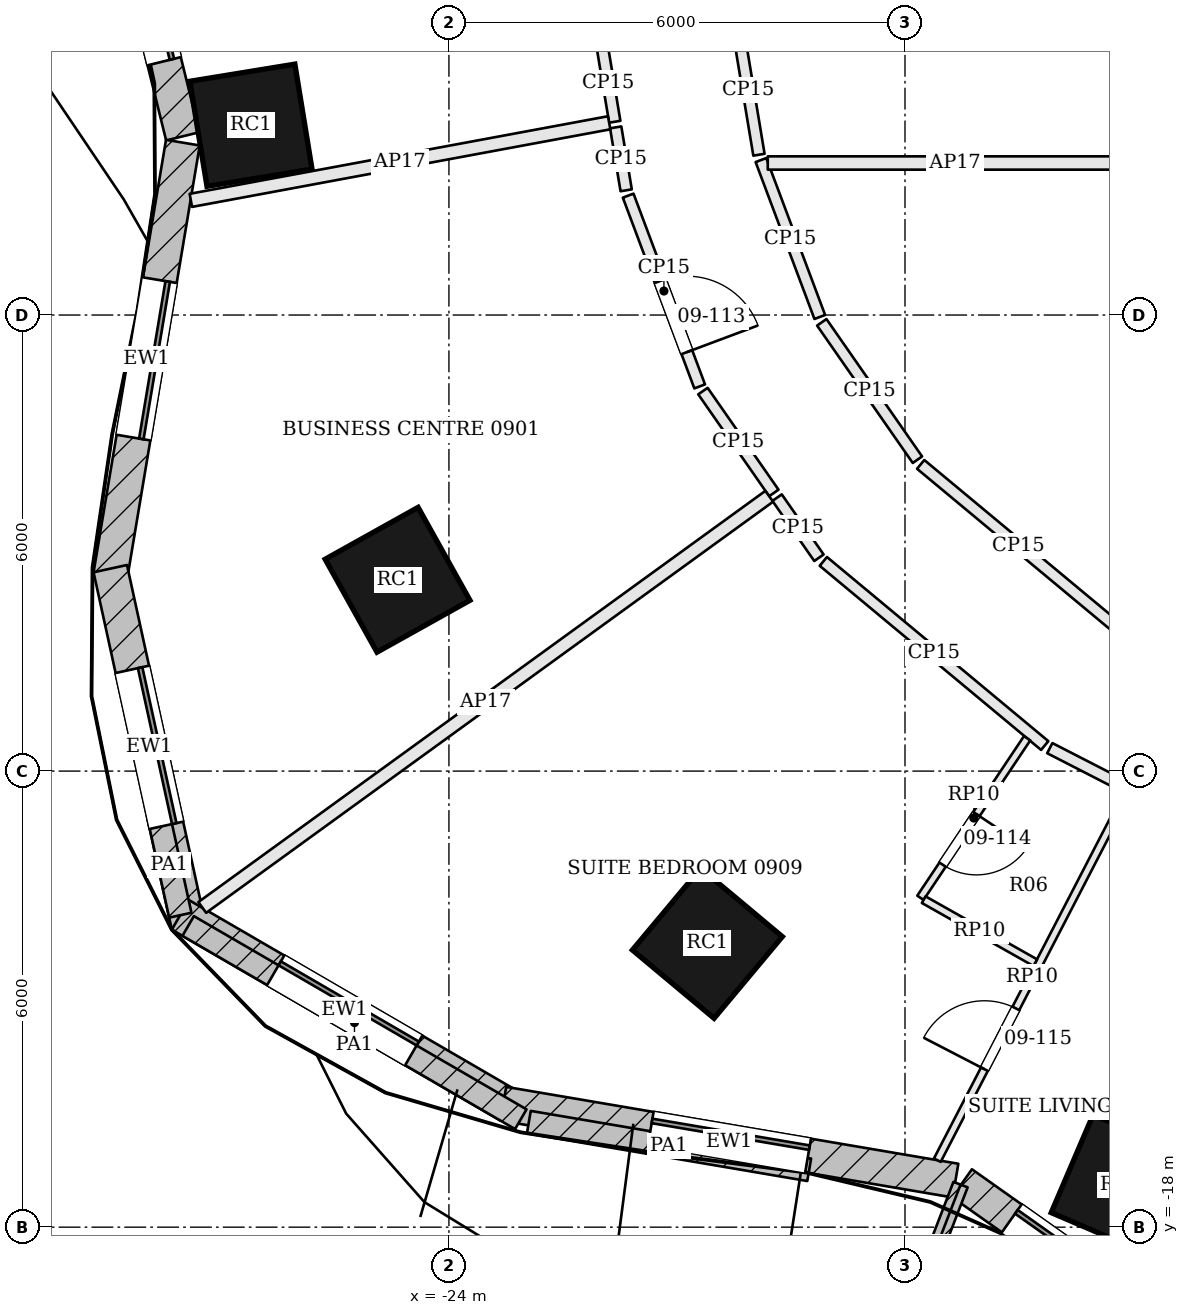
"""IFC4 building model, lengths in metres.
Left out: names, types, materials, properties, quantities, classifications, styles, units other than length and angle.
Written with IfcOpenShell. Run it as: python <this file> out.ifc"""

import sys

from ifc_helpers import new_model, si_unit, direction, frame, frame_2d, origin, origin_2d, place, context, subcontext, project, spatial, rectangle, extrude, element, fill, save


model = new_model("IFC4")
c1 = context("Model", 3, precision=1e-05, world=origin(), true_north=direction((0.0, 1.0)))
c2 = subcontext(c1, "Body", "Model", "MODEL_VIEW")
j1 = project(units=[si_unit("LENGTHUNIT", "METRE"), si_unit("PLANEANGLEUNIT", "RADIAN")], contexts=[c1])
p1 = place(None, origin())
s1 = spatial("IfcSite", under=j1, at=p1, CompositionType="ELEMENT")
p2 = place(p1, origin())
s2 = spatial("IfcBuilding", under=s1, at=p2, CompositionType="ELEMENT")
p3 = place(p2, frame((0.0, 0.0, 48.3)))
s3 = spatial("IfcBuildingStorey", under=s2, at=p3, CompositionType="ELEMENT", Elevation=48.3)
for number, where, z_axis, x_axis in (
    (1, (-26.605, -3.503, 0.0), (0.0, 0.0, 1.0), (0.161, -0.987, 0.0)),
    (2, (-24.676, -9.483, 0.0), (0.0, 0.0, 1.0), (0.487, -0.873, 0.0)),
    (3, (-20.6, -14.266, 0.0), (0.0, 0.0, 1.0), (0.767, -0.641, 0.0)),
    (4, (-15.157, -17.441, 0.0), (0.0, 0.0, 1.0), (0.919, -0.394, 0.0)),
):
    element("IfcColumn", number, at=place(p3, frame(where, z_axis=z_axis, x_axis=x_axis)), inside=s3, PredefinedType="COLUMN", context=c2, shape_type="SweptSolid", body=[
        extrude(rectangle(XDim=1.4, YDim=1.4, at=origin_2d()), origin(), (0.0, 0.0, 1.0), 3.6),
    ])
p4 = place(p3, frame((-28.422, 0.075, 0.0), z_axis=(0.0, 0.0, 1.0), x_axis=(0.239809222807, -0.970820033094, 0.0)))
e5 = element("IfcWall", 5, at=p4, inside=s3, PredefinedType="SOLIDWALL", context=c2, shape_type="SweptSolid", body=[
    extrude(rectangle(XDim=3.836, YDim=0.45, at=frame_2d((1.918, 0.0))), origin(), (0.0, 0.0, 1.0), 3.4),
])
p5 = place(p4, frame((1.018, 0.0, 0.9)))
e6 = element("IfcOpeningElement", 6, at=p5, cuts=e5, PredefinedType="OPENING", context=c2, shape_type="SweptSolid", body=[
    extrude(rectangle(XDim=1.8, YDim=2.0, at=frame_2d((0.9, 1.0))), frame((0.0, 0.235, 0.0), z_axis=(0.0, -1.0, 0.0), x_axis=(1.0, 0.0, 0.0)), (0.0, 0.0, 1.0), 0.47),
])
p6 = place(p3, frame((-27.5, -3.732, 0.0), z_axis=(0.0, 0.0, 1.0), x_axis=(-0.165174419367, -0.986264371853, 0.0)))
e7 = element("IfcWall", 7, at=p6, inside=s3, PredefinedType="SOLIDWALL", context=c2, shape_type="SweptSolid", body=[
    extrude(rectangle(XDim=5.769, YDim=0.45, at=frame_2d((2.885, 0.0))), origin(), (0.0, 0.0, 1.0), 3.4),
])
p7 = place(p6, frame((1.834, 0.0, 0.9)))
e8 = element("IfcOpeningElement", 8, at=p7, cuts=e7, PredefinedType="OPENING", context=c2, shape_type="SweptSolid", body=[
    extrude(rectangle(XDim=2.1, YDim=2.0, at=frame_2d((1.05, 1.0))), frame((0.0, 0.235, 0.0), z_axis=(0.0, -1.0, 0.0), x_axis=(1.0, 0.0, 0.0)), (0.0, 0.0, 1.0), 0.47),
])
p8 = place(p3, frame((-28.456, -9.337, 0.0), z_axis=(0.0, 0.0, 1.0), x_axis=(0.213878425795, -0.976860286315, 0.0)))
e9 = element("IfcWall", 9, at=p8, inside=s3, PredefinedType="SOLIDWALL", context=c2, shape_type="SweptSolid", body=[
    extrude(rectangle(XDim=4.812, YDim=0.45, at=frame_2d((2.406, 0.0))), origin(), (0.0, 0.0, 1.0), 3.4),
])
p9 = place(p8, frame((1.356, 0.0, 0.9)))
e10 = element("IfcOpeningElement", 10, at=p9, cuts=e9, PredefinedType="OPENING", context=c2, shape_type="SweptSolid", body=[
    extrude(rectangle(XDim=2.1, YDim=2.0, at=frame_2d((1.05, 1.0))), frame((0.0, 0.235, 0.0), z_axis=(0.0, -1.0, 0.0), x_axis=(1.0, 0.0, 0.0)), (0.0, 0.0, 1.0), 0.47),
])
p10 = place(p3, frame((-27.533, -13.891, 0.0), z_axis=(0.0, 0.0, 1.0), x_axis=(0.864657614938, -0.502361631625, 0.0)))
e11 = element("IfcWall", 11, at=p10, inside=s3, PredefinedType="SOLIDWALL", context=c2, shape_type="SweptSolid", body=[
    extrude(rectangle(XDim=5.001, YDim=0.45, at=frame_2d((2.5, 0.0))), origin(), (0.0, 0.0, 1.0), 3.4),
])
p11 = place(p10, frame((1.45, 0.0, 0.9)))
e12 = element("IfcOpeningElement", 12, at=p11, cuts=e11, PredefinedType="OPENING", context=c2, shape_type="SweptSolid", body=[
    extrude(rectangle(XDim=2.1, YDim=2.0, at=frame_2d((1.05, 1.0))), frame((0.0, 0.235, 0.0), z_axis=(0.0, -1.0, 0.0), x_axis=(1.0, 0.0, 0.0)), (0.0, 0.0, 1.0), 0.47),
])
p12 = place(p3, frame((-23.284, -16.376, 0.0), z_axis=(0.0, 0.0, 1.0), x_axis=(0.985861729428, -0.167560885797, 0.0)))
e13 = element("IfcWall", 13, at=p12, inside=s3, PredefinedType="SOLIDWALL", context=c2, shape_type="SweptSolid", body=[
    extrude(rectangle(XDim=6.033, YDim=0.45, at=frame_2d((3.017, 0.0))), origin(), (0.0, 0.0, 1.0), 3.4),
])
p13 = place(p12, frame((1.967, 0.0, 0.9)))
e14 = element("IfcOpeningElement", 14, at=p13, cuts=e13, PredefinedType="OPENING", context=c2, shape_type="SweptSolid", body=[
    extrude(rectangle(XDim=2.1, YDim=2.0, at=frame_2d((1.05, 1.0))), frame((0.0, 0.235, 0.0), z_axis=(0.0, -1.0, 0.0), x_axis=(1.0, 0.0, 0.0)), (0.0, 0.0, 1.0), 0.47),
])
p14 = place(p3, frame((-17.249, -17.422, 0.0), z_axis=(0.0, 0.0, 1.0), x_axis=(0.816589291225, -0.577219134694, 0.0)))
e15 = element("IfcWall", 15, at=p14, inside=s3, PredefinedType="SOLIDWALL", context=c2, shape_type="SweptSolid", body=[
    extrude(rectangle(XDim=3.701, YDim=0.45, at=frame_2d((1.851, 0.0))), origin(), (0.0, 0.0, 1.0), 3.4),
])
p15 = place(p14, frame((0.801, 0.0, 0.9)))
e16 = element("IfcOpeningElement", 16, at=p15, cuts=e15, PredefinedType="OPENING", context=c2, shape_type="SweptSolid", body=[
    extrude(rectangle(XDim=2.1, YDim=2.0, at=frame_2d((1.05, 1.0))), frame((0.0, 0.235, 0.0), z_axis=(0.0, -1.0, 0.0), x_axis=(1.0, 0.0, 0.0)), (0.0, 0.0, 1.0), 0.47),
])
p16 = place(p3, frame((-17.269, -17.44, 0.0), z_axis=(0.0, 0.0, 1.0), x_axis=(-0.359381039836, -0.933190906624, 0.0)))
e17 = element("IfcWall", 17, at=p16, inside=s3, PredefinedType="SOLIDWALL", context=c2, shape_type="SweptSolid", body=[
    extrude(rectangle(XDim=1.75, YDim=0.2, at=frame_2d((0.875, 0.0))), origin(), (0.0, 0.0, 1.0), 3.4),
])
p17 = place(p3, frame((-27.823, -12.577, 3.6), z_axis=(0.0, 0.0, 1.0), x_axis=(0.213826357694, -0.976871684898, 0.0)))
e18 = element("IfcWall", 18, at=p17, inside=s3, PredefinedType="PARAPET", context=c2, shape_type="SweptSolid", body=[
    extrude(rectangle(XDim=1.35, YDim=0.3, at=frame_2d((0.675, 0.0))), origin(), (0.0, 0.0, 1.0), 1.1),
])
p18 = place(p3, frame((-27.431, -14.038, 3.6), z_axis=(0.0, 0.0, 1.0), x_axis=(0.864664590165, -0.502349625773, 0.0)))
e19 = element("IfcWall", 19, at=p18, inside=s3, PredefinedType="PARAPET", context=c2, shape_type="SweptSolid", body=[
    extrude(rectangle(XDim=5.061, YDim=0.3, at=frame_2d((2.531, 0.0))), origin(), (0.0, 0.0, 1.0), 1.1),
])
p19 = place(p3, frame((-22.949, -16.618, 3.6), z_axis=(0.0, 0.0, 1.0), x_axis=(0.985859727788, -0.167572662229, 0.0)))
e20 = element("IfcWall", 20, at=p19, inside=s3, PredefinedType="PARAPET", context=c2, shape_type="SweptSolid", body=[
    extrude(rectangle(XDim=3.741, YDim=0.3, at=frame_2d((1.871, 0.0))), origin(), (0.0, 0.0, 1.0), 1.1),
])
p20 = place(p3, frame((-21.989, -2.43, 0.0), z_axis=(0.0, 0.0, 1.0), x_axis=(0.164170791844, -0.986431929281, 0.0)))
e21 = element("IfcWall", 21, at=p20, inside=s3, PredefinedType="PARTITIONING", context=c2, shape_type="SweptSolid", body=[
    extrude(rectangle(XDim=1.041, YDim=0.15, at=frame_2d((0.521, 0.0))), origin(), (0.0, 0.0, 1.0), 2.68),
])
p21 = place(p3, frame((-27.396, -4.491, 0.0), z_axis=(0.0, 0.0, 1.0), x_axis=(0.983238590395, 0.182323543069, 0.0)))
e22 = element("IfcWall", 22, at=p21, inside=s3, PredefinedType="PARTITIONING", context=c2, shape_type="SweptSolid", body=[
    extrude(rectangle(XDim=5.597, YDim=0.175, at=frame_2d((2.799, 0.0))), origin(), (0.0, 0.0, 1.0), 2.68),
])
p22 = place(p3, frame((-21.806, -3.531, 0.0), z_axis=(0.0, 0.0, 1.0), x_axis=(0.164068764938, -0.986448904086, 0.0)))
e23 = element("IfcWall", 23, at=p22, inside=s3, PredefinedType="PARTITIONING", context=c2, shape_type="SweptSolid", body=[
    extrude(rectangle(XDim=0.839, YDim=0.15, at=frame_2d((0.42, 0.0))), origin(), (0.0, 0.0, 1.0), 2.68),
])
p23 = place(p3, frame((-21.642, -4.429, 0.0), z_axis=(0.0, 0.0, 1.0), x_axis=(0.350963719781, -0.936389057709, 0.0)))
e24 = element("IfcWall", 24, at=p23, inside=s3, PredefinedType="PARTITIONING", context=c2, shape_type="SweptSolid", body=[
    extrude(rectangle(XDim=2.68, YDim=0.15, at=frame_2d((1.34, 0.0))), origin(), (0.0, 0.0, 1.0), 2.68),
])
p24 = place(p23, frame((1.199, 0.0, 0.0)))
e25 = element("IfcOpeningElement", 25, at=p24, cuts=e24, PredefinedType="OPENING", context=c2, shape_type="SweptSolid", body=[
    extrude(rectangle(XDim=1.0, YDim=2.1, at=frame_2d((0.5, 1.05))), frame((0.0, 0.085, 0.0), z_axis=(0.0, -1.0, 0.0), x_axis=(1.0, 0.0, 0.0)), (0.0, 0.0, 1.0), 0.17),
])
p25 = place(p3, frame((-20.658, -7.0, 0.0), z_axis=(0.0, 0.0, 1.0), x_axis=(0.571252828516, -0.820774150368, 0.0)))
e26 = element("IfcWall", 26, at=p25, inside=s3, PredefinedType="PARTITIONING", context=c2, shape_type="SweptSolid", body=[
    extrude(rectangle(XDim=1.633, YDim=0.15, at=frame_2d((0.816, 0.0))), origin(), (0.0, 0.0, 1.0), 2.68),
])
p26 = place(p3, frame((-27.245, -13.794, 0.0), z_axis=(0.0, 0.0, 1.0), x_axis=(0.809549997568, 0.587050935982, 0.0)))
e27 = element("IfcWall", 27, at=p26, inside=s3, PredefinedType="PARTITIONING", context=c2, shape_type="SweptSolid", body=[
    extrude(rectangle(XDim=9.214, YDim=0.175, at=frame_2d((4.607, 0.0))), origin(), (0.0, 0.0, 1.0), 2.68),
])
p27 = place(p3, frame((-19.683, -8.402, 0.0), z_axis=(0.0, 0.0, 1.0), x_axis=(0.571250030839, -0.820776097524, 0.0)))
e28 = element("IfcWall", 28, at=p27, inside=s3, PredefinedType="PARTITIONING", context=c2, shape_type="SweptSolid", body=[
    extrude(rectangle(XDim=0.964, YDim=0.15, at=frame_2d((0.482, 0.0))), origin(), (0.0, 0.0, 1.0), 2.68),
])
p28 = place(p3, frame((-19.074, -9.241, 0.0), z_axis=(0.0, 0.0, 1.0), x_axis=(0.768812565259, -0.639474189863, 0.0)))
e29 = element("IfcWall", 29, at=p28, inside=s3, PredefinedType="PARTITIONING", context=c2, shape_type="SweptSolid", body=[
    extrude(rectangle(XDim=3.788, YDim=0.15, at=frame_2d((1.894, 0.0))), origin(), (0.0, 0.0, 1.0), 2.68),
])
p29 = place(p3, frame((-16.095, -11.698, 0.0), z_axis=(0.0, 0.0, 1.0), x_axis=(0.88955984693, -0.456818649717, 0.0)))
e30 = element("IfcWall", 30, at=p29, inside=s3, PredefinedType="PARTITIONING", context=c2, shape_type="SweptSolid", body=[
    extrude(rectangle(XDim=2.991, YDim=0.15, at=frame_2d((1.496, 0.0))), origin(), (0.0, 0.0, 1.0), 2.68),
])
p30 = place(p29, frame((1.7, 0.0, 0.0)))
e31 = element("IfcOpeningElement", 31, at=p30, cuts=e30, PredefinedType="OPENING", context=c2, shape_type="SweptSolid", body=[
    extrude(rectangle(XDim=1.0, YDim=2.1, at=frame_2d((0.5, 1.05))), frame((0.0, 0.085, 0.0), z_axis=(0.0, -1.0, 0.0), x_axis=(1.0, 0.0, 0.0)), (0.0, 0.0, 1.0), 0.17),
])
p31 = place(p3, frame((-19.921, -3.891, 0.0), z_axis=(0.0, 0.0, 1.0), x_axis=(-0.164100753818, 0.986443583078, 0.0)))
e32 = element("IfcWall", 32, at=p31, inside=s3, PredefinedType="PARTITIONING", context=c2, shape_type="SweptSolid", body=[
    extrude(rectangle(XDim=1.726, YDim=0.15, at=frame_2d((0.863, 0.0))), origin(), (0.0, 0.0, 1.0), 2.68),
])
p32 = place(p3, frame((-15.221, -10.105, 0.0), z_axis=(0.0, 0.0, 1.0), x_axis=(-0.768812916989, 0.639473766992, 0.0)))
e33 = element("IfcWall", 33, at=p32, inside=s3, PredefinedType="PARTITIONING", context=c2, shape_type="SweptSolid", body=[
    extrude(rectangle(XDim=3.347, YDim=0.15, at=frame_2d((1.673, 0.0))), origin(), (0.0, 0.0, 1.0), 2.68),
])
p33 = place(p3, frame((-17.836, -7.904, 0.0), z_axis=(0.0, 0.0, 1.0), x_axis=(-0.571317790711, 0.820728933338, 0.0)))
e34 = element("IfcWall", 34, at=p33, inside=s3, PredefinedType="PARTITIONING", context=c2, shape_type="SweptSolid", body=[
    extrude(rectangle(XDim=2.202, YDim=0.15, at=frame_2d((1.101, 0.0))), origin(), (0.0, 0.0, 1.0), 2.68),
])
p34 = place(p3, frame((-19.121, -6.026, 0.0), z_axis=(0.0, 0.0, 1.0), x_axis=(-0.351026357955, 0.936365578191, 0.0)))
e35 = element("IfcWall", 35, at=p34, inside=s3, PredefinedType="PARTITIONING", context=c2, shape_type="SweptSolid", body=[
    extrude(rectangle(XDim=2.205, YDim=0.15, at=frame_2d((1.103, 0.0))), origin(), (0.0, 0.0, 1.0), 2.68),
])
p35 = place(p3, frame((-17.575, -17.118, 0.0), z_axis=(0.0, 0.0, 1.0), x_axis=(0.459775633783, 0.888035115623, 0.0)))
e36 = element("IfcWall", 36, at=p35, inside=s3, PredefinedType="PARTITIONING", context=c2, shape_type="SweptSolid", body=[
    extrude(rectangle(XDim=5.423, YDim=0.1, at=frame_2d((2.711, 0.0))), origin(), (0.0, 0.0, 1.0), 2.934),
])
p36 = place(p35, frame((1.348, 0.0, 0.0)))
e37 = element("IfcOpeningElement", 37, at=p36, cuts=e36, PredefinedType="OPENING", context=c2, shape_type="SweptSolid", body=[
    extrude(rectangle(XDim=0.9, YDim=2.4, at=frame_2d((0.45, 1.2))), frame((0.0, 0.06, 0.0), z_axis=(0.0, -1.0, 0.0), x_axis=(1.0, 0.0, 0.0)), (0.0, 0.0, 1.0), 0.12),
])
p37 = place(p3, frame((-16.393, -11.568, 0.0), z_axis=(0.0, 0.0, 1.0), x_axis=(-0.555949061639, -0.831216362245, 0.0)))
e38 = element("IfcWall", 38, at=p37, inside=s3, PredefinedType="PARTITIONING", context=c2, shape_type="SweptSolid", body=[
    extrude(rectangle(XDim=2.525, YDim=0.1, at=frame_2d((1.263, 0.0))), origin(), (0.0, 0.0, 1.0), 2.934),
])
p38 = place(p37, frame((1.2, 0.0, 0.0)))
e39 = element("IfcOpeningElement", 39, at=p38, cuts=e38, PredefinedType="OPENING", context=c2, shape_type="SweptSolid", body=[
    extrude(rectangle(XDim=0.8, YDim=2.1, at=frame_2d((0.4, 1.05))), frame((0.0, 0.06, 0.0), z_axis=(0.0, -1.0, 0.0), x_axis=(1.0, 0.0, 0.0)), (0.0, 0.0, 1.0), 0.12),
])
p39 = place(p3, frame((-17.754, -13.692, 0.0), z_axis=(0.0, 0.0, 1.0), x_axis=(0.870754296655, -0.491718369452, 0.0)))
e40 = element("IfcWall", 40, at=p39, inside=s3, PredefinedType="PARTITIONING", context=c2, shape_type="SweptSolid", body=[
    extrude(rectangle(XDim=1.686, YDim=0.1, at=frame_2d((0.843, 0.0))), origin(), (0.0, 0.0, 1.0), 2.934),
])
p40 = place(p3, frame((-19.805, -4.0, 0.0), z_axis=(0.0, 0.0, 1.0), x_axis=(1.0, 0.0, 0.0)))
e41 = element("IfcWall", 41, at=p40, inside=s3, PredefinedType="PARTITIONING", context=c2, shape_type="SweptSolid", body=[
    extrude(rectangle(XDim=4.93, YDim=0.175, at=frame_2d((2.465, 0.0))), origin(), (0.0, 0.0, 1.0), 2.68),
])
p41 = place(p5, origin())
e42 = element("IfcWindow", 42, at=p41, inside=s3, PartitioningType="SINGLE_PANEL", PredefinedType="WINDOW", context=c2, shape_type="SweptSolid", body=[
    extrude(rectangle(XDim=1.8, YDim=2.0, at=frame_2d((0.9, 1.0))), frame((0.0, 0.135, 0.0), z_axis=(0.0, -1.0, 0.0), x_axis=(1.0, 0.0, 0.0)), (0.0, 0.0, 1.0), 0.06),
])
fill(e6, e42)
p42 = place(p7, origin())
e43 = element("IfcWindow", 43, at=p42, inside=s3, PartitioningType="SINGLE_PANEL", PredefinedType="WINDOW", context=c2, shape_type="SweptSolid", body=[
    extrude(rectangle(XDim=2.1, YDim=2.0, at=frame_2d((1.05, 1.0))), frame((0.0, 0.135, 0.0), z_axis=(0.0, -1.0, 0.0), x_axis=(1.0, 0.0, 0.0)), (0.0, 0.0, 1.0), 0.06),
])
fill(e8, e43)
p43 = place(p9, origin())
e44 = element("IfcWindow", 44, at=p43, inside=s3, PartitioningType="SINGLE_PANEL", PredefinedType="WINDOW", context=c2, shape_type="SweptSolid", body=[
    extrude(rectangle(XDim=2.1, YDim=2.0, at=frame_2d((1.05, 1.0))), frame((0.0, 0.135, 0.0), z_axis=(0.0, -1.0, 0.0), x_axis=(1.0, 0.0, 0.0)), (0.0, 0.0, 1.0), 0.06),
])
fill(e10, e44)
p44 = place(p11, origin())
e45 = element("IfcWindow", 45, at=p44, inside=s3, PartitioningType="SINGLE_PANEL", PredefinedType="WINDOW", context=c2, shape_type="SweptSolid", body=[
    extrude(rectangle(XDim=2.1, YDim=2.0, at=frame_2d((1.05, 1.0))), frame((0.0, 0.135, 0.0), z_axis=(0.0, -1.0, 0.0), x_axis=(1.0, 0.0, 0.0)), (0.0, 0.0, 1.0), 0.06),
])
fill(e12, e45)
p45 = place(p13, origin())
e46 = element("IfcWindow", 46, at=p45, inside=s3, PartitioningType="SINGLE_PANEL", PredefinedType="WINDOW", context=c2, shape_type="SweptSolid", body=[
    extrude(rectangle(XDim=2.1, YDim=2.0, at=frame_2d((1.05, 1.0))), frame((0.0, 0.135, 0.0), z_axis=(0.0, -1.0, 0.0), x_axis=(1.0, 0.0, 0.0)), (0.0, 0.0, 1.0), 0.06),
])
fill(e14, e46)
p46 = place(p15, origin())
e47 = element("IfcWindow", 47, at=p46, inside=s3, PartitioningType="SINGLE_PANEL", PredefinedType="WINDOW", context=c2, shape_type="SweptSolid", body=[
    extrude(rectangle(XDim=2.1, YDim=2.0, at=frame_2d((1.05, 1.0))), frame((0.0, 0.135, 0.0), z_axis=(0.0, -1.0, 0.0), x_axis=(1.0, 0.0, 0.0)), (0.0, 0.0, 1.0), 0.06),
])
fill(e16, e47)
p47 = place(p24, origin())
e48 = element("IfcDoor", 48, at=p47, inside=s3, OperationType="SINGLE_SWING_RIGHT", PredefinedType="DOOR", context=c2, shape_type="SweptSolid", body=[
    extrude(rectangle(XDim=1.0, YDim=2.1, at=frame_2d((0.5, 1.05))), frame((0.0, 0.025, 0.0), z_axis=(0.0, -1.0, 0.0), x_axis=(1.0, 0.0, 0.0)), (0.0, 0.0, 1.0), 0.05),
])
fill(e25, e48)
p48 = place(p38, origin())
e49 = element("IfcDoor", 49, at=p48, inside=s3, OperationType="SINGLE_SWING_LEFT", PredefinedType="DOOR", context=c2, shape_type="SweptSolid", body=[
    extrude(rectangle(XDim=0.8, YDim=2.1, at=frame_2d((0.4, 1.05))), frame((0.0, 0.025, 0.0), z_axis=(0.0, -1.0, 0.0), x_axis=(1.0, 0.0, 0.0)), (0.0, 0.0, 1.0), 0.05),
])
fill(e39, e49)
p49 = place(p36, origin())
e50 = element("IfcDoor", 50, at=p49, inside=s3, OperationType="SINGLE_SWING_LEFT", PredefinedType="DOOR", context=c2, shape_type="SweptSolid", body=[
    extrude(rectangle(XDim=0.9, YDim=2.4, at=frame_2d((0.45, 1.2))), frame((0.0, 0.025, 0.0), z_axis=(0.0, -1.0, 0.0), x_axis=(1.0, 0.0, 0.0)), (0.0, 0.0, 1.0), 0.05),
])
fill(e37, e50)
save(model, sys.argv[1])
